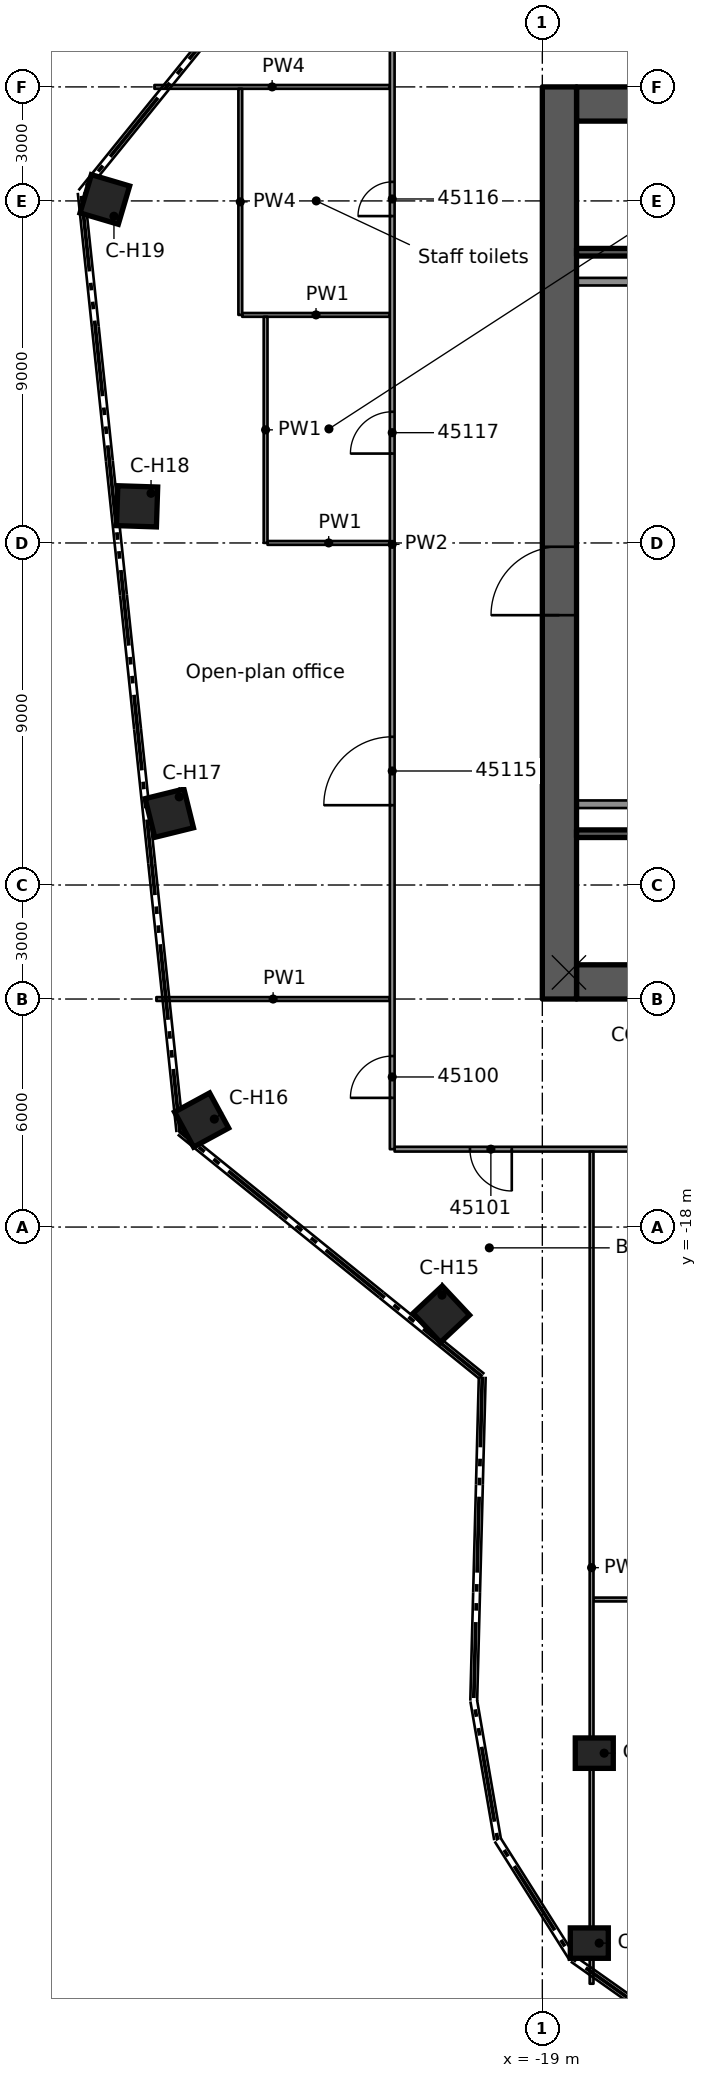
"""IFC4 building model, lengths in metres.
Left out: names, types, materials, properties, quantities, classifications, styles, units other than length and angle.
Written with IfcOpenShell. Run it as: python <this file> out.ifc"""

import sys

from ifc_helpers import new_model, si_unit, direction, frame, frame_2d, origin, origin_2d, place, context, subcontext, project, spatial, rectangle, extrude, element, fill, save


model = new_model("IFC4")
c1 = context("Model", 3, precision=1e-05, world=origin(), true_north=direction((0.0, 1.0)))
c2 = subcontext(c1, "Body", "Model", "MODEL_VIEW")
j1 = project(units=[si_unit("LENGTHUNIT", "METRE"), si_unit("PLANEANGLEUNIT", "RADIAN")], contexts=[c1])
p1 = place(None, origin())
s1 = spatial("IfcSite", under=j1, at=p1, CompositionType="ELEMENT")
p2 = place(p1, origin())
s2 = spatial("IfcBuilding", under=s1, at=p2, CompositionType="ELEMENT")
p3 = place(p2, frame((0.0, 0.0, 221.0)))
s3 = spatial("IfcBuildingStorey", under=s2, at=p3, CompositionType="ELEMENT", Elevation=221.0)
p4 = place(p3, frame((-18.1, 11.55, 0.0), z_axis=(0.0, 0.0, 1.0), x_axis=(1.0, 0.0, 0.0)))
e1 = element("IfcWall", 1, at=p4, inside=s3, PredefinedType="SHEAR", context=c2, shape_type="SweptSolid", body=[
    extrude(rectangle(XDim=9.2, YDim=0.9, at=frame_2d((4.6, 0.0))), origin(), (0.0, 0.0, 1.0), 3.5),
])
p5 = place(p4, frame((5.1, 0.0, 0.0)))
e2 = element("IfcOpeningElement", 2, at=p5, cuts=e1, PredefinedType="OPENING", context=c2, shape_type="SweptSolid", body=[
    extrude(rectangle(XDim=1.1, YDim=2.1, at=frame_2d((0.55, 1.05))), frame((0.0, 0.46, 0.0), z_axis=(0.0, -1.0, 0.0), x_axis=(1.0, 0.0, 0.0)), (0.0, 0.0, 1.0), 0.92),
])
p6 = place(p3, frame((-18.1, -11.55, 0.0), z_axis=(0.0, 0.0, 1.0), x_axis=(1.0, 0.0, 0.0)))
e3 = element("IfcWall", 3, at=p6, inside=s3, PredefinedType="SHEAR", context=c2, shape_type="SweptSolid", body=[
    extrude(rectangle(XDim=9.2, YDim=0.9, at=frame_2d((4.6, 0.0))), origin(), (0.0, 0.0, 1.0), 3.5),
])
p7 = place(p6, frame((5.1, 0.0, 0.0)))
e4 = element("IfcOpeningElement", 4, at=p7, cuts=e3, PredefinedType="OPENING", context=c2, shape_type="SweptSolid", body=[
    extrude(rectangle(XDim=1.1, YDim=2.1, at=frame_2d((0.55, 1.05))), frame((0.0, 0.46, 0.0), z_axis=(0.0, -1.0, 0.0), x_axis=(1.0, 0.0, 0.0)), (0.0, 0.0, 1.0), 0.92),
])
p8 = place(p6, frame((7.53, 0.0, 0.0)))
e5 = element("IfcOpeningElement", 5, at=p8, cuts=e3, PredefinedType="OPENING", context=c2, shape_type="SweptSolid", body=[
    extrude(rectangle(XDim=0.9, YDim=2.1, at=frame_2d((0.45, 1.05))), frame((0.0, 0.46, 0.0), z_axis=(0.0, -1.0, 0.0), x_axis=(1.0, 0.0, 0.0)), (0.0, 0.0, 1.0), 0.92),
])
p9 = place(p3, frame((-18.55, -12.0, 0.0), z_axis=(0.0, 0.0, 1.0), x_axis=(0.0, 1.0, 0.0)))
e6 = element("IfcWall", 6, at=p9, inside=s3, PredefinedType="SHEAR", context=c2, shape_type="SweptSolid", body=[
    extrude(rectangle(XDim=24.0, YDim=0.9, at=frame_2d((12.0, 0.0))), origin(), (0.0, 0.0, 1.0), 3.5),
])
p10 = place(p9, frame((10.1, 0.0, 0.0)))
e7 = element("IfcOpeningElement", 7, at=p10, cuts=e6, PredefinedType="OPENING", context=c2, shape_type="SweptSolid", body=[
    extrude(rectangle(XDim=1.8, YDim=2.1, at=frame_2d((0.9, 1.05))), frame((0.0, 0.46, 0.0), z_axis=(0.0, -1.0, 0.0), x_axis=(1.0, 0.0, 0.0)), (0.0, 0.0, 1.0), 0.92),
])
for number, where, z_axis, x_axis in (
    (8, (-17.764, -36.841, 0.0), (0.0, 0.0, 1.0), (1.0, 0.0, 0.0)),
    (9, (-17.633, -31.843, 0.0), (0.0, 0.0, 1.0), (1.0, 0.0, 0.0)),
):
    element("IfcColumn", number, at=place(p3, frame(where, z_axis=z_axis, x_axis=x_axis)), inside=s3, PredefinedType="COLUMN", context=c2, shape_type="SweptSolid", body=[
        extrude(rectangle(XDim=1.0, YDim=0.8, at=origin_2d()), origin(), (0.0, 0.0, 1.0), 3.5),
    ])
for number, where, z_axis, x_axis in (
    (10, (-21.657, -20.293, 0.0), (0.0, 0.0, 1.0), (-0.73, -0.684, 0.0)),
    (11, (-27.966, -15.184, 0.0), (0.0, 0.0, 1.0), (-0.879, -0.477, 0.0)),
    (12, (-28.815, -7.11, 0.0), (0.0, 0.0, 1.0), (-0.971, -0.24, 0.0)),
    (13, (-29.663, 0.964, 0.0), (0.0, 0.0, 1.0), (-0.999, 0.032, 0.0)),
    (14, (-30.512, 9.038, 0.0), (0.0, 0.0, 1.0), (-0.959, 0.284, 0.0)),
):
    element("IfcColumn", number, at=place(p3, frame(where, z_axis=z_axis, x_axis=x_axis)), inside=s3, PredefinedType="COLUMN", context=c2, shape_type="SweptSolid", body=[
        extrude(rectangle(XDim=1.05, YDim=1.05, at=origin_2d()), origin(), (0.0, 0.0, 1.0), 3.5),
    ])
for number, where, z_axis, x_axis in (
    (15, (-11.54, 6.875, 0.0), (0.0, 0.0, 1.0), (-1.0, 0.0, 0.0)),
    (16, (-11.54, -6.875, 0.0), (0.0, 0.0, 1.0), (-1.0, 0.0, 0.0)),
    (17, (-11.54, 7.65, 0.0), (0.0, 0.0, 1.0), (-1.0, 0.0, 0.0)),
    (18, (-11.54, -7.65, 0.0), (0.0, 0.0, 1.0), (-1.0, 0.0, 0.0)),
):
    element("IfcWall", number, at=place(p3, frame(where, z_axis=z_axis, x_axis=x_axis)), inside=s3, PredefinedType="SOLIDWALL", context=c2, shape_type="SweptSolid", body=[
        extrude(rectangle(XDim=6.56, YDim=0.2, at=frame_2d((3.28, 0.0))), origin(), (0.0, 0.0, 1.0), 3.08),
    ])
p11 = place(p3, frame((-17.654, -27.8, 0.0), z_axis=(0.0, 0.0, 1.0), x_axis=(1.0, 0.0, 0.0)))
e19 = element("IfcWall", 19, at=p11, inside=s3, PredefinedType="PARTITIONING", context=c2, shape_type="SweptSolid", body=[
    extrude(rectangle(XDim=11.655, YDim=0.1, at=frame_2d((5.828, 0.0))), origin(), (0.0, 0.0, 1.0), 3.06),
])
p12 = place(p3, frame((-12.611, -15.951, 0.0), z_axis=(0.0, 0.0, 1.0), x_axis=(-1.0, 0.0, 0.0)))
e20 = element("IfcWall", 20, at=p12, inside=s3, PredefinedType="PARTITIONING", context=c2, shape_type="SweptSolid", body=[
    extrude(rectangle(XDim=10.276, YDim=0.125, at=frame_2d((5.138, 0.0))), origin(), (0.0, 0.0, 1.0), 3.06),
])
p13 = place(p12, frame((7.193, 0.0, 0.0)))
e21 = element("IfcOpeningElement", 21, at=p13, cuts=e20, PredefinedType="OPENING", context=c2, shape_type="SweptSolid", body=[
    extrude(rectangle(XDim=1.1, YDim=2.1, at=frame_2d((0.55, 1.05))), frame((0.0, 0.073, 0.0), z_axis=(0.0, -1.0, 0.0), x_axis=(1.0, 0.0, 0.0)), (0.0, 0.0, 1.0), 0.145),
])
p14 = place(p3, frame((-29.156, -12.0, 0.0), z_axis=(0.0, 0.0, 1.0), x_axis=(1.0, 0.0, 0.0)))
e22 = element("IfcWall", 22, at=p14, inside=s3, PredefinedType="PARTITIONING", context=c2, shape_type="SweptSolid", body=[
    extrude(rectangle(XDim=6.144, YDim=0.1, at=frame_2d((3.072, 0.0))), origin(), (0.0, 0.0, 1.0), 3.06),
])
p15 = place(p3, frame((-26.231, 0.001, 0.0), z_axis=(0.0, 0.0, 1.0), x_axis=(1.0, 0.0, 0.0)))
e23 = element("IfcWall", 23, at=p15, inside=s3, PredefinedType="PARTITIONING", context=c2, shape_type="SweptSolid", body=[
    extrude(rectangle(XDim=3.219, YDim=0.1, at=frame_2d((1.609, 0.0))), origin(), (0.0, 0.0, 1.0), 3.06),
])
p16 = place(p3, frame((-26.898, 6.001, 0.0), z_axis=(0.0, 0.0, 1.0), x_axis=(1.0, 0.0, 0.0)))
e24 = element("IfcWall", 24, at=p16, inside=s3, PredefinedType="PARTITIONING", context=c2, shape_type="SweptSolid", body=[
    extrude(rectangle(XDim=3.886, YDim=0.1, at=frame_2d((1.943, 0.0))), origin(), (0.0, 0.0, 1.0), 3.06),
])
p17 = place(p3, frame((-29.207, 12.0, 0.0), z_axis=(0.0, 0.0, 1.0), x_axis=(1.0, 0.0, 0.0)))
e25 = element("IfcWall", 25, at=p17, inside=s3, PredefinedType="PARTITIONING", context=c2, shape_type="SweptSolid", body=[
    extrude(rectangle(XDim=6.195, YDim=0.1, at=frame_2d((3.098, 0.0))), origin(), (0.0, 0.0, 1.0), 2.449),
])
p18 = place(p3, frame((-17.704, -37.91, 0.0), z_axis=(0.0, 0.0, 1.0), x_axis=(0.0, 1.0, 0.0)))
e26 = element("IfcWall", 26, at=p18, inside=s3, PredefinedType="PARTITIONING", context=c2, shape_type="SweptSolid", body=[
    extrude(rectangle(XDim=21.896, YDim=0.1, at=frame_2d((10.948, 0.0))), origin(), (0.0, 0.0, 1.0), 3.06),
])
p19 = place(p3, frame((-22.95, -15.951, 0.0), z_axis=(0.0, 0.0, 1.0), x_axis=(0.0, 1.0, 0.0)))
e27 = element("IfcWall", 27, at=p19, inside=s3, PredefinedType="PARTITIONING", context=c2, shape_type="SweptSolid", body=[
    extrude(rectangle(XDim=31.829, YDim=0.125, at=frame_2d((15.915, 0.0))), origin(), (0.0, 0.0, 1.0), 3.06),
])
p20 = place(p19, frame((1.35, 0.0, 0.0)))
e28 = element("IfcOpeningElement", 28, at=p20, cuts=e27, PredefinedType="OPENING", context=c2, shape_type="SweptSolid", body=[
    extrude(rectangle(XDim=1.1, YDim=2.1, at=frame_2d((0.55, 1.05))), frame((0.0, 0.073, 0.0), z_axis=(0.0, -1.0, 0.0), x_axis=(1.0, 0.0, 0.0)), (0.0, 0.0, 1.0), 0.145),
])
p21 = place(p19, frame((9.051, 0.0, 0.0)))
e29 = element("IfcOpeningElement", 29, at=p21, cuts=e27, PredefinedType="OPENING", context=c2, shape_type="SweptSolid", body=[
    extrude(rectangle(XDim=1.8, YDim=2.1, at=frame_2d((0.9, 1.05))), frame((0.0, 0.073, 0.0), z_axis=(0.0, -1.0, 0.0), x_axis=(1.0, 0.0, 0.0)), (0.0, 0.0, 1.0), 0.145),
])
p22 = place(p19, frame((24.552, 0.0, 0.0)))
e30 = element("IfcOpeningElement", 30, at=p22, cuts=e27, PredefinedType="OPENING", context=c2, shape_type="SweptSolid", body=[
    extrude(rectangle(XDim=0.9, YDim=2.1, at=frame_2d((0.45, 1.05))), frame((0.0, 0.073, 0.0), z_axis=(0.0, -1.0, 0.0), x_axis=(1.0, 0.0, 0.0)), (0.0, 0.0, 1.0), 0.145),
])
p23 = place(p19, frame((18.303, 0.0, 0.0)))
e31 = element("IfcOpeningElement", 31, at=p23, cuts=e27, PredefinedType="OPENING", context=c2, shape_type="SweptSolid", body=[
    extrude(rectangle(XDim=1.1, YDim=2.1, at=frame_2d((0.55, 1.05))), frame((0.0, 0.073, 0.0), z_axis=(0.0, -1.0, 0.0), x_axis=(1.0, 0.0, 0.0)), (0.0, 0.0, 1.0), 0.145),
])
p24 = place(p3, frame((-26.282, 0.002, 0.0), z_axis=(0.0, 0.0, 1.0), x_axis=(0.0, 1.0, 0.0)))
e32 = element("IfcWall", 32, at=p24, inside=s3, PredefinedType="PARTITIONING", context=c2, shape_type="SweptSolid", body=[
    extrude(rectangle(XDim=5.949, YDim=0.1, at=frame_2d((2.975, 0.0))), origin(), (0.0, 0.0, 1.0), 3.06),
])
p25 = place(p3, frame((-26.948, 6.001, 0.0), z_axis=(0.0, 0.0, 1.0), x_axis=(0.0, 1.0, 0.0)))
e33 = element("IfcWall", 33, at=p25, inside=s3, PredefinedType="PARTITIONING", context=c2, shape_type="SweptSolid", body=[
    extrude(rectangle(XDim=5.949, YDim=0.1, at=frame_2d((2.975, 0.0))), origin(), (0.0, 0.0, 1.0), 2.449),
])
p26 = place(p10, origin())
e34 = element("IfcDoor", 34, at=p26, inside=s3, OperationType="SINGLE_SWING_LEFT", PredefinedType="DOOR", context=c2, shape_type="SweptSolid", body=[
    extrude(rectangle(XDim=1.8, YDim=2.1, at=frame_2d((0.9, 1.05))), frame((0.0, 0.025, 0.0), z_axis=(0.0, -1.0, 0.0), x_axis=(1.0, 0.0, 0.0)), (0.0, 0.0, 1.0), 0.05),
])
fill(e7, e34)
p27 = place(p20, origin())
e35 = element("IfcDoor", 35, at=p27, inside=s3, OperationType="SINGLE_SWING_LEFT", PredefinedType="DOOR", context=c2, shape_type="SweptSolid", body=[
    extrude(rectangle(XDim=1.1, YDim=2.1, at=frame_2d((0.55, 1.05))), frame((0.0, 0.025, 0.0), z_axis=(0.0, -1.0, 0.0), x_axis=(1.0, 0.0, 0.0)), (0.0, 0.0, 1.0), 0.05),
])
fill(e28, e35)
p28 = place(p13, origin())
e36 = element("IfcDoor", 36, at=p28, inside=s3, OperationType="SINGLE_SWING_RIGHT", PredefinedType="DOOR", context=c2, shape_type="SweptSolid", body=[
    extrude(rectangle(XDim=1.1, YDim=2.1, at=frame_2d((0.55, 1.05))), frame((0.0, 0.025, 0.0), z_axis=(0.0, -1.0, 0.0), x_axis=(1.0, 0.0, 0.0)), (0.0, 0.0, 1.0), 0.05),
])
fill(e21, e36)
p29 = place(p21, origin())
e37 = element("IfcDoor", 37, at=p29, inside=s3, OperationType="DOUBLE_DOOR_SINGLE_SWING", PredefinedType="DOOR", context=c2, shape_type="SweptSolid", body=[
    extrude(rectangle(XDim=1.8, YDim=2.1, at=frame_2d((0.9, 1.05))), frame((0.0, 0.025, 0.0), z_axis=(0.0, -1.0, 0.0), x_axis=(1.0, 0.0, 0.0)), (0.0, 0.0, 1.0), 0.05),
])
fill(e29, e37)
p30 = place(p22, origin())
e38 = element("IfcDoor", 38, at=p30, inside=s3, OperationType="SINGLE_SWING_RIGHT", PredefinedType="DOOR", context=c2, shape_type="SweptSolid", body=[
    extrude(rectangle(XDim=0.9, YDim=2.1, at=frame_2d((0.45, 1.05))), frame((0.0, 0.025, 0.0), z_axis=(0.0, -1.0, 0.0), x_axis=(1.0, 0.0, 0.0)), (0.0, 0.0, 1.0), 0.05),
])
fill(e30, e38)
p31 = place(p23, origin())
e39 = element("IfcDoor", 39, at=p31, inside=s3, OperationType="SINGLE_SWING_RIGHT", PredefinedType="DOOR", context=c2, shape_type="SweptSolid", body=[
    extrude(rectangle(XDim=1.1, YDim=2.1, at=frame_2d((0.55, 1.05))), frame((0.0, 0.025, 0.0), z_axis=(0.0, -1.0, 0.0), x_axis=(1.0, 0.0, 0.0)), (0.0, 0.0, 1.0), 0.05),
])
fill(e31, e39)
save(model, sys.argv[1])
